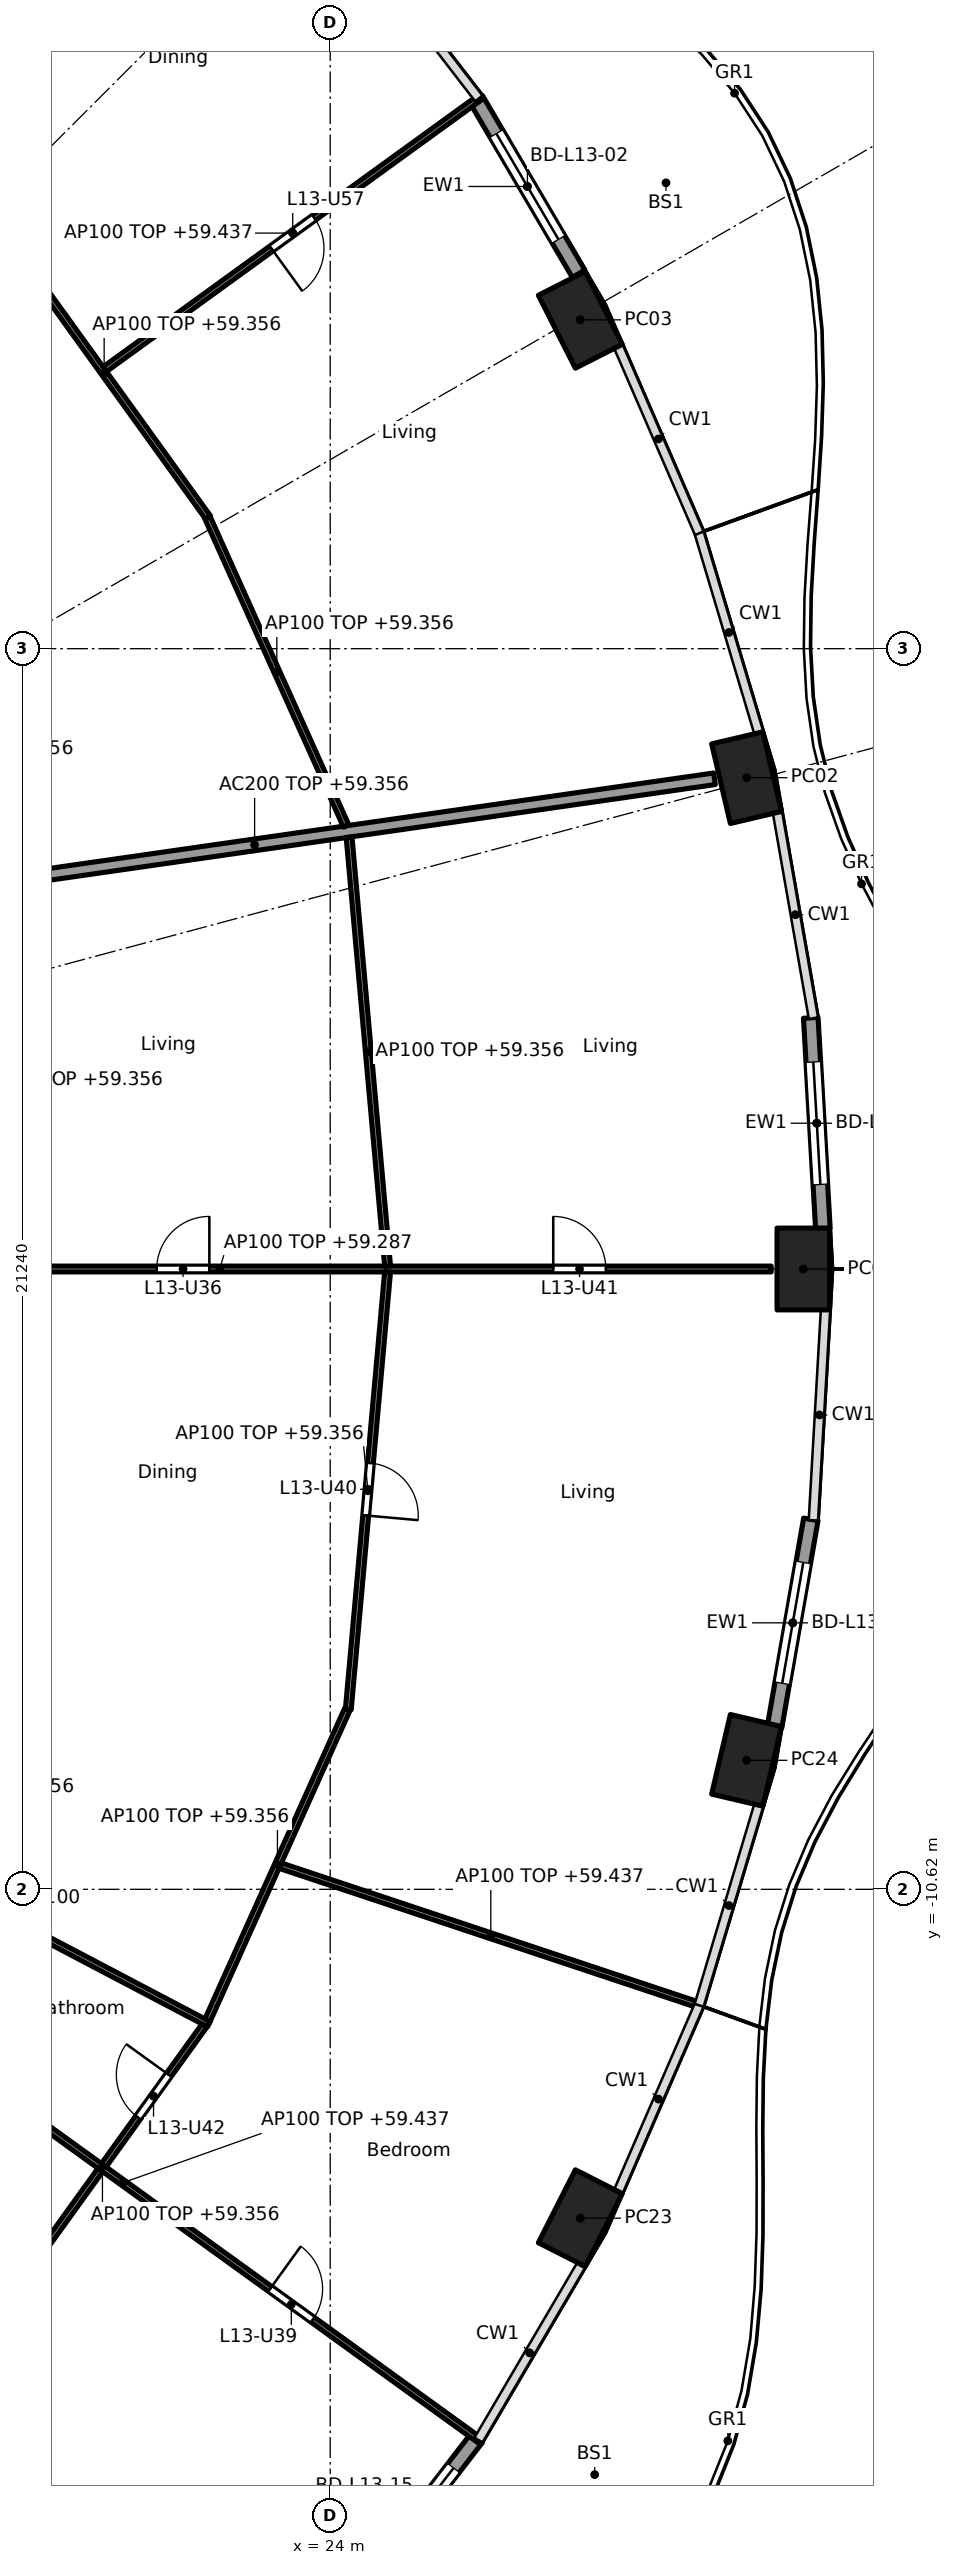
"""IFC4 building model, lengths in metres.
Left out: names, types, materials, properties, quantities, classifications, styles, units other than length and angle.
Written with IfcOpenShell. Run it as: python <this file> out.ifc"""

import sys

from ifc_helpers import new_model, si_unit, direction, frame, frame_2d, origin, origin_2d, place, context, subcontext, project, spatial, rectangle, hollow_rectangle, extrude, element, fill, save


model = new_model("IFC4")
c1 = context("Model", 3, precision=1e-05, world=origin(), true_north=direction((0.0, 1.0)))
c2 = subcontext(c1, "Body", "Model", "MODEL_VIEW")
j1 = project(units=[si_unit("LENGTHUNIT", "METRE"), si_unit("PLANEANGLEUNIT", "RADIAN")], contexts=[c1])
p1 = place(None, origin())
s1 = spatial("IfcSite", under=j1, at=p1, CompositionType="ELEMENT")
p2 = place(p1, origin())
s2 = spatial("IfcBuilding", under=s1, at=p2, CompositionType="ELEMENT")
p3 = place(p2, frame((0.0, 0.0, 56.6)))
s3 = spatial("IfcBuildingStorey", under=s2, at=p3, CompositionType="ELEMENT", Elevation=56.6)
for number, where, z_axis, x_axis in (
    (1, (32.1, 0.0, 0.0), (0.0, 0.0, 1.0), (0.0, 1.0, 0.0)),
    (2, (31.129, 8.412, 0.0), (0.0, 0.0, 1.0), (-0.229, 0.973, 0.0)),
    (3, (28.282, 16.25, 0.0), (0.0, 0.0, 1.0), (-0.452, 0.892, 0.0)),
    (4, (28.282, -16.25, 0.0), (0.0, 0.0, 1.0), (0.452, 0.892, 0.0)),
    (5, (31.129, -8.412, 0.0), (0.0, 0.0, 1.0), (0.229, 0.973, 0.0)),
):
    element("IfcColumn", number, at=place(p3, frame(where, z_axis=z_axis, x_axis=x_axis)), inside=s3, PredefinedType="COLUMN", context=c2, shape_type="SweptSolid", body=[
        extrude(hollow_rectangle(XDim=1.4, YDim=0.9, WallThickness=0.05, at=origin_2d()), origin(), (0.0, 0.0, 1.0), 3.7),
    ])
p4 = place(p3, frame((32.227, 4.3, 0.0), z_axis=(0.0, 0.0, 1.0), x_axis=(0.057546046339, -0.998342853208, 0.0)))
e6 = element("IfcWall", 6, at=p4, inside=s3, PredefinedType="SOLIDWALL", context=c2, shape_type="SweptSolid", body=[
    extrude(rectangle(XDim=3.615, YDim=0.25, at=frame_2d((1.807, 0.0))), origin(), (0.0, 0.0, 1.0), 3.44),
])
p5 = place(p4, frame((0.757, 0.0, 0.0)))
e7 = element("IfcOpeningElement", 7, at=p5, cuts=e6, PredefinedType="OPENING", context=c2, shape_type="SweptSolid", body=[
    extrude(rectangle(XDim=2.1, YDim=2.4, at=frame_2d((1.05, 1.2))), frame((0.0, 0.135, 0.0), z_axis=(0.0, -1.0, 0.0), x_axis=(1.0, 0.0, 0.0)), (0.0, 0.0, 1.0), 0.27),
])
p6 = place(p3, frame((26.5, 20.026, 0.0), z_axis=(0.0, 0.0, 1.0), x_axis=(0.506311160839, -0.862350861546, 0.0)))
e8 = element("IfcWall", 8, at=p6, inside=s3, PredefinedType="SOLIDWALL", context=c2, shape_type="SweptSolid", body=[
    extrude(rectangle(XDim=3.462, YDim=0.25, at=frame_2d((1.731, 0.0))), origin(), (0.0, 0.0, 1.0), 3.44),
])
p7 = place(p6, frame((0.681, 0.0, 0.0)))
e9 = element("IfcOpeningElement", 9, at=p7, cuts=e8, PredefinedType="OPENING", context=c2, shape_type="SweptSolid", body=[
    extrude(rectangle(XDim=2.1, YDim=2.4, at=frame_2d((1.05, 1.2))), frame((0.0, 0.135, 0.0), z_axis=(0.0, -1.0, 0.0), x_axis=(1.0, 0.0, 0.0)), (0.0, 0.0, 1.0), 0.27),
])
p8 = place(p3, frame((26.508, -20.013, 0.0), z_axis=(0.0, 0.0, 1.0), x_axis=(-0.610457147657, -0.792049285635, 0.0)))
e10 = element("IfcWall", 10, at=p8, inside=s3, PredefinedType="SOLIDWALL", context=c2, shape_type="SweptSolid", body=[
    extrude(rectangle(XDim=3.397, YDim=0.25, at=frame_2d((1.699, 0.0))), origin(), (0.0, 0.0, 1.0), 3.44),
])
p9 = place(p8, frame((0.649, 0.0, 0.0)))
e11 = element("IfcOpeningElement", 11, at=p9, cuts=e10, PredefinedType="OPENING", context=c2, shape_type="SweptSolid", body=[
    extrude(rectangle(XDim=2.1, YDim=2.4, at=frame_2d((1.05, 1.2))), frame((0.0, 0.135, 0.0), z_axis=(0.0, -1.0, 0.0), x_axis=(1.0, 0.0, 0.0)), (0.0, 0.0, 1.0), 0.27),
])
p10 = place(p3, frame((32.229, -4.286, 0.0), z_axis=(0.0, 0.0, 1.0), x_axis=(-0.172217377323, -0.98505897029, 0.0)))
e12 = element("IfcWall", 12, at=p10, inside=s3, PredefinedType="SOLIDWALL", context=c2, shape_type="SweptSolid", body=[
    extrude(rectangle(XDim=3.598, YDim=0.25, at=frame_2d((1.799, 0.0))), origin(), (0.0, 0.0, 1.0), 3.44),
])
p11 = place(p10, frame((0.749, 0.0, 0.0)))
e13 = element("IfcOpeningElement", 13, at=p11, cuts=e12, PredefinedType="OPENING", context=c2, shape_type="SweptSolid", body=[
    extrude(rectangle(XDim=2.1, YDim=2.4, at=frame_2d((1.05, 1.2))), frame((0.0, 0.135, 0.0), z_axis=(0.0, -1.0, 0.0), x_axis=(1.0, 0.0, 0.0)), (0.0, 0.0, 1.0), 0.27),
])
p12 = place(p3, frame((14.832, 6.13, 0.0), z_axis=(0.0, 0.0, 1.0), x_axis=(0.989836541293, 0.142209779978, 0.0)))
e14 = element("IfcWall", 14, at=p12, inside=s3, PredefinedType="PARTITIONING", context=c2, shape_type="SweptSolid", body=[
    extrude(rectangle(XDim=15.909, YDim=0.2, at=frame_2d((7.955, 0.0))), origin(), (0.0, 0.0, 1.0), 2.756),
])
p13 = place(p3, frame((12.665, 0.0, 0.0), z_axis=(0.0, 0.0, 1.0), x_axis=(1.0, 0.0, 0.0)))
e15 = element("IfcWall", 15, at=p13, inside=s3, PredefinedType="PARTITIONING", context=c2, shape_type="SweptSolid", body=[
    extrude(rectangle(XDim=18.885, YDim=0.1, at=frame_2d((9.443, 0.0))), origin(), (0.0, 0.0, 1.0), 2.687),
])
p14 = place(p13, frame((2.205, 0.0, 0.0)))
e16 = element("IfcOpeningElement", 16, at=p14, cuts=e15, PredefinedType="OPENING", context=c2, shape_type="SweptSolid", body=[
    extrude(rectangle(XDim=0.9, YDim=2.1, at=frame_2d((0.45, 1.05))), frame((0.0, 0.06, 0.0), z_axis=(0.0, -1.0, 0.0), x_axis=(1.0, 0.0, 0.0)), (0.0, 0.0, 1.0), 0.12),
])
p15 = place(p13, frame((8.366, 0.0, 0.0)))
e17 = element("IfcOpeningElement", 17, at=p15, cuts=e15, PredefinedType="OPENING", context=c2, shape_type="SweptSolid", body=[
    extrude(rectangle(XDim=0.9, YDim=2.1, at=frame_2d((0.45, 1.05))), frame((0.0, 0.06, 0.0), z_axis=(0.0, -1.0, 0.0), x_axis=(1.0, 0.0, 0.0)), (0.0, 0.0, 1.0), 0.12),
])
p16 = place(p13, frame((15.154, 0.0, 0.0)))
e18 = element("IfcOpeningElement", 18, at=p16, cuts=e15, PredefinedType="OPENING", context=c2, shape_type="SweptSolid", body=[
    extrude(rectangle(XDim=0.9, YDim=2.1, at=frame_2d((0.45, 1.05))), frame((0.0, 0.06, 0.0), z_axis=(0.0, -1.0, 0.0), x_axis=(1.0, 0.0, 0.0)), (0.0, 0.0, 1.0), 0.12),
])
p17 = place(p3, frame((24.982, 0.05, 0.0), z_axis=(0.0, 0.0, 1.0), x_axis=(-0.08944290521, 0.995991951126, 0.0)))
e19 = element("IfcWall", 19, at=p17, inside=s3, PredefinedType="PARTITIONING", context=c2, shape_type="SweptSolid", body=[
    extrude(rectangle(XDim=7.373, YDim=0.1, at=frame_2d((3.686, 0.0))), origin(), (0.0, 0.0, 1.0), 2.756),
])
p18 = place(p3, frame((24.982, -0.05, 0.0), z_axis=(0.0, 0.0, 1.0), x_axis=(-0.089444214321, -0.995991833563, 0.0)))
e20 = element("IfcWall", 20, at=p18, inside=s3, PredefinedType="PARTITIONING", context=c2, shape_type="SweptSolid", body=[
    extrude(rectangle(XDim=7.523, YDim=0.1, at=frame_2d((3.761, 0.0))), origin(), (0.0, 0.0, 1.0), 2.756),
])
p19 = place(p18, frame((3.286, 0.0, 0.0)))
e21 = element("IfcOpeningElement", 21, at=p19, cuts=e20, PredefinedType="OPENING", context=c2, shape_type="SweptSolid", body=[
    extrude(rectangle(XDim=0.9, YDim=2.1, at=frame_2d((0.45, 1.05))), frame((0.0, 0.06, 0.0), z_axis=(0.0, -1.0, 0.0), x_axis=(1.0, 0.0, 0.0)), (0.0, 0.0, 1.0), 0.12),
])
p20 = place(p3, frame((24.273, 7.584, 0.0), z_axis=(0.0, 0.0, 1.0), x_axis=(-0.410201529109, 0.911994904326, 0.0)))
e22 = element("IfcWall", 22, at=p20, inside=s3, PredefinedType="PARTITIONING", context=c2, shape_type="SweptSolid", body=[
    extrude(rectangle(XDim=5.787, YDim=0.1, at=frame_2d((2.894, 0.0))), origin(), (0.0, 0.0, 1.0), 2.756),
])
p21 = place(p3, frame((21.908, 12.866, 0.0), z_axis=(0.0, 0.0, 1.0), x_axis=(-0.584558392935, 0.811351640936, 0.0)))
e23 = element("IfcWall", 23, at=p21, inside=s3, PredefinedType="PARTITIONING", context=c2, shape_type="SweptSolid", body=[
    extrude(rectangle(XDim=6.084, YDim=0.1, at=frame_2d((3.042, 0.0))), origin(), (0.0, 0.0, 1.0), 2.756),
])
p22 = place(p3, frame((20.141, 15.405, 0.0), z_axis=(0.0, 0.0, 1.0), x_axis=(0.809834895779, 0.58665785734, 0.0)))
e24 = element("IfcWall", 24, at=p22, inside=s3, PredefinedType="PARTITIONING", context=c2, shape_type="SweptSolid", body=[
    extrude(rectangle(XDim=7.945, YDim=0.1, at=frame_2d((3.973, 0.0))), origin(), (0.0, 0.0, 1.0), 2.837),
])
p23 = place(p22, frame((3.522, 0.0, 0.0)))
e25 = element("IfcOpeningElement", 25, at=p23, cuts=e24, PredefinedType="OPENING", context=c2, shape_type="SweptSolid", body=[
    extrude(rectangle(XDim=0.9, YDim=2.1, at=frame_2d((0.45, 1.05))), frame((0.0, 0.06, 0.0), z_axis=(0.0, -1.0, 0.0), x_axis=(1.0, 0.0, 0.0)), (0.0, 0.0, 1.0), 0.12),
])
p24 = place(p3, frame((16.142, 19.858, 0.0), z_axis=(0.0, 0.0, 1.0), x_axis=(0.628738066508, 0.777617157555, 0.0)))
e26 = element("IfcWall", 26, at=p24, inside=s3, PredefinedType="PARTITIONING", context=c2, shape_type="SweptSolid", body=[
    extrude(rectangle(XDim=8.091, YDim=0.1, at=frame_2d((4.045, 0.0))), origin(), (0.0, 0.0, 1.0), 2.837),
])
p25 = place(p24, frame((3.595, 0.0, 0.0)))
e27 = element("IfcOpeningElement", 27, at=p25, cuts=e26, PredefinedType="OPENING", context=c2, shape_type="SweptSolid", body=[
    extrude(rectangle(XDim=0.9, YDim=2.1, at=frame_2d((0.45, 1.05))), frame((0.0, 0.06, 0.0), z_axis=(0.0, -1.0, 0.0), x_axis=(1.0, 0.0, 0.0)), (0.0, 0.0, 1.0), 0.12),
])
p26 = place(p3, frame((18.351, -17.803, 0.0), z_axis=(0.0, 0.0, 1.0), x_axis=(0.584563700282, 0.811347817099, 0.0)))
e28 = element("IfcWall", 28, at=p26, inside=s3, PredefinedType="PARTITIONING", context=c2, shape_type="SweptSolid", body=[
    extrude(rectangle(XDim=5.984, YDim=0.1, at=frame_2d((2.992, 0.0))), origin(), (0.0, 0.0, 1.0), 2.756),
])
p27 = place(p26, frame((4.038, 0.0, 0.0)))
e29 = element("IfcOpeningElement", 29, at=p27, cuts=e28, PredefinedType="OPENING", context=c2, shape_type="SweptSolid", body=[
    extrude(rectangle(XDim=0.9, YDim=2.1, at=frame_2d((0.45, 1.05))), frame((0.0, 0.06, 0.0), z_axis=(0.0, -1.0, 0.0), x_axis=(1.0, 0.0, 0.0)), (0.0, 0.0, 1.0), 0.12),
])
p28 = place(p3, frame((14.329, -11.221, 0.0), z_axis=(0.0, 0.0, 1.0), x_axis=(0.810671130917, -0.58550176558, 0.0)))
e30 = element("IfcWall", 30, at=p28, inside=s3, PredefinedType="PARTITIONING", context=c2, shape_type="SweptSolid", body=[
    extrude(rectangle(XDim=15.106, YDim=0.1, at=frame_2d((7.553, 0.0))), origin(), (0.0, 0.0, 1.0), 2.837),
])
p29 = place(p28, frame((10.659, 0.0, 0.0)))
e31 = element("IfcOpeningElement", 31, at=p29, cuts=e30, PredefinedType="OPENING", context=c2, shape_type="SweptSolid", body=[
    extrude(rectangle(XDim=0.9, YDim=2.1, at=frame_2d((0.45, 1.05))), frame((0.0, 0.06, 0.0), z_axis=(0.0, -1.0, 0.0), x_axis=(1.0, 0.0, 0.0)), (0.0, 0.0, 1.0), 0.12),
])
p30 = place(p3, frame((15.538, -9.574, 0.0), z_axis=(0.0, 0.0, 1.0), x_axis=(0.88517945493, -0.465249752895, 0.0)))
e32 = element("IfcWall", 32, at=p30, inside=s3, PredefinedType="PARTITIONING", context=c2, shape_type="SweptSolid", body=[
    extrude(rectangle(XDim=7.213, YDim=0.1, at=frame_2d((3.606, 0.0))), origin(), (0.0, 0.0, 1.0), 3.44),
])
p31 = place(p3, frame((21.899, -12.861, 0.0), z_axis=(0.0, 0.0, 1.0), x_axis=(0.410197710154, 0.911996622025, 0.0)))
e33 = element("IfcWall", 33, at=p31, inside=s3, PredefinedType="PARTITIONING", context=c2, shape_type="SweptSolid", body=[
    extrude(rectangle(XDim=5.837, YDim=0.1, at=frame_2d((2.918, 0.0))), origin(), (0.0, 0.0, 1.0), 2.756),
])
p32 = place(p3, frame((23.144, -10.216, 0.0), z_axis=(0.0, 0.0, 1.0), x_axis=(0.948811715359, -0.315842253027, 0.0)))
e34 = element("IfcWall", 34, at=p32, inside=s3, PredefinedType="PARTITIONING", context=c2, shape_type="SweptSolid", body=[
    extrude(rectangle(XDim=7.6, YDim=0.1, at=frame_2d((3.8, 0.0))), origin(), (0.0, 0.0, 1.0), 2.837),
])
p33 = place(p5, origin())
e35 = element("IfcDoor", 35, at=p33, inside=s3, OperationType="SLIDING_TO_LEFT", PredefinedType="DOOR", context=c2, shape_type="SweptSolid", body=[
    extrude(rectangle(XDim=2.1, YDim=2.4, at=frame_2d((1.05, 1.2))), frame((0.0, 0.025, 0.0), z_axis=(0.0, -1.0, 0.0), x_axis=(1.0, 0.0, 0.0)), (0.0, 0.0, 1.0), 0.05),
])
fill(e7, e35)
p34 = place(p7, origin())
e36 = element("IfcDoor", 36, at=p34, inside=s3, OperationType="SLIDING_TO_LEFT", PredefinedType="DOOR", context=c2, shape_type="SweptSolid", body=[
    extrude(rectangle(XDim=2.1, YDim=2.4, at=frame_2d((1.05, 1.2))), frame((0.0, 0.025, 0.0), z_axis=(0.0, -1.0, 0.0), x_axis=(1.0, 0.0, 0.0)), (0.0, 0.0, 1.0), 0.05),
])
fill(e9, e36)
p35 = place(p9, origin())
e37 = element("IfcDoor", 37, at=p35, inside=s3, OperationType="SLIDING_TO_LEFT", PredefinedType="DOOR", context=c2, shape_type="SweptSolid", body=[
    extrude(rectangle(XDim=2.1, YDim=2.4, at=frame_2d((1.05, 1.2))), frame((0.0, 0.025, 0.0), z_axis=(0.0, -1.0, 0.0), x_axis=(1.0, 0.0, 0.0)), (0.0, 0.0, 1.0), 0.05),
])
fill(e11, e37)
p36 = place(p11, origin())
e38 = element("IfcDoor", 38, at=p36, inside=s3, OperationType="SLIDING_TO_LEFT", PredefinedType="DOOR", context=c2, shape_type="SweptSolid", body=[
    extrude(rectangle(XDim=2.1, YDim=2.4, at=frame_2d((1.05, 1.2))), frame((0.0, 0.025, 0.0), z_axis=(0.0, -1.0, 0.0), x_axis=(1.0, 0.0, 0.0)), (0.0, 0.0, 1.0), 0.05),
])
fill(e13, e38)
p37 = place(p15, origin())
e39 = element("IfcDoor", 39, at=p37, inside=s3, OperationType="SINGLE_SWING_RIGHT", PredefinedType="DOOR", context=c2, shape_type="SweptSolid", body=[
    extrude(rectangle(XDim=0.9, YDim=2.1, at=frame_2d((0.45, 1.05))), frame((0.0, 0.025, 0.0), z_axis=(0.0, -1.0, 0.0), x_axis=(1.0, 0.0, 0.0)), (0.0, 0.0, 1.0), 0.05),
])
fill(e17, e39)
p38 = place(p29, origin())
e40 = element("IfcDoor", 40, at=p38, inside=s3, OperationType="SINGLE_SWING_LEFT", PredefinedType="DOOR", context=c2, shape_type="SweptSolid", body=[
    extrude(rectangle(XDim=0.9, YDim=2.1, at=frame_2d((0.45, 1.05))), frame((0.0, 0.025, 0.0), z_axis=(0.0, -1.0, 0.0), x_axis=(1.0, 0.0, 0.0)), (0.0, 0.0, 1.0), 0.05),
])
fill(e31, e40)
p39 = place(p19, origin())
e41 = element("IfcDoor", 41, at=p39, inside=s3, OperationType="SINGLE_SWING_RIGHT", PredefinedType="DOOR", context=c2, shape_type="SweptSolid", body=[
    extrude(rectangle(XDim=0.9, YDim=2.1, at=frame_2d((0.45, 1.05))), frame((0.0, 0.025, 0.0), z_axis=(0.0, -1.0, 0.0), x_axis=(1.0, 0.0, 0.0)), (0.0, 0.0, 1.0), 0.05),
])
fill(e21, e41)
p40 = place(p16, origin())
e42 = element("IfcDoor", 42, at=p40, inside=s3, OperationType="SINGLE_SWING_LEFT", PredefinedType="DOOR", context=c2, shape_type="SweptSolid", body=[
    extrude(rectangle(XDim=0.9, YDim=2.1, at=frame_2d((0.45, 1.05))), frame((0.0, 0.025, 0.0), z_axis=(0.0, -1.0, 0.0), x_axis=(1.0, 0.0, 0.0)), (0.0, 0.0, 1.0), 0.05),
])
fill(e18, e42)
p41 = place(p27, origin())
e43 = element("IfcDoor", 43, at=p41, inside=s3, OperationType="SINGLE_SWING_RIGHT", PredefinedType="DOOR", context=c2, shape_type="SweptSolid", body=[
    extrude(rectangle(XDim=0.9, YDim=2.1, at=frame_2d((0.45, 1.05))), frame((0.0, 0.025, 0.0), z_axis=(0.0, -1.0, 0.0), x_axis=(1.0, 0.0, 0.0)), (0.0, 0.0, 1.0), 0.05),
])
fill(e29, e43)
p42 = place(p23, frame((0.9, 0.0, 0.0), x_axis=(-1.0, 0.0, 0.0)))
e44 = element("IfcDoor", 44, at=p42, inside=s3, OperationType="SINGLE_SWING_RIGHT", PredefinedType="DOOR", context=c2, shape_type="SweptSolid", body=[
    extrude(rectangle(XDim=0.9, YDim=2.1, at=frame_2d((0.45, 1.05))), frame((0.0, 0.025, 0.0), z_axis=(0.0, -1.0, 0.0), x_axis=(1.0, 0.0, 0.0)), (0.0, 0.0, 1.0), 0.05),
])
fill(e25, e44)
save(model, sys.argv[1])
